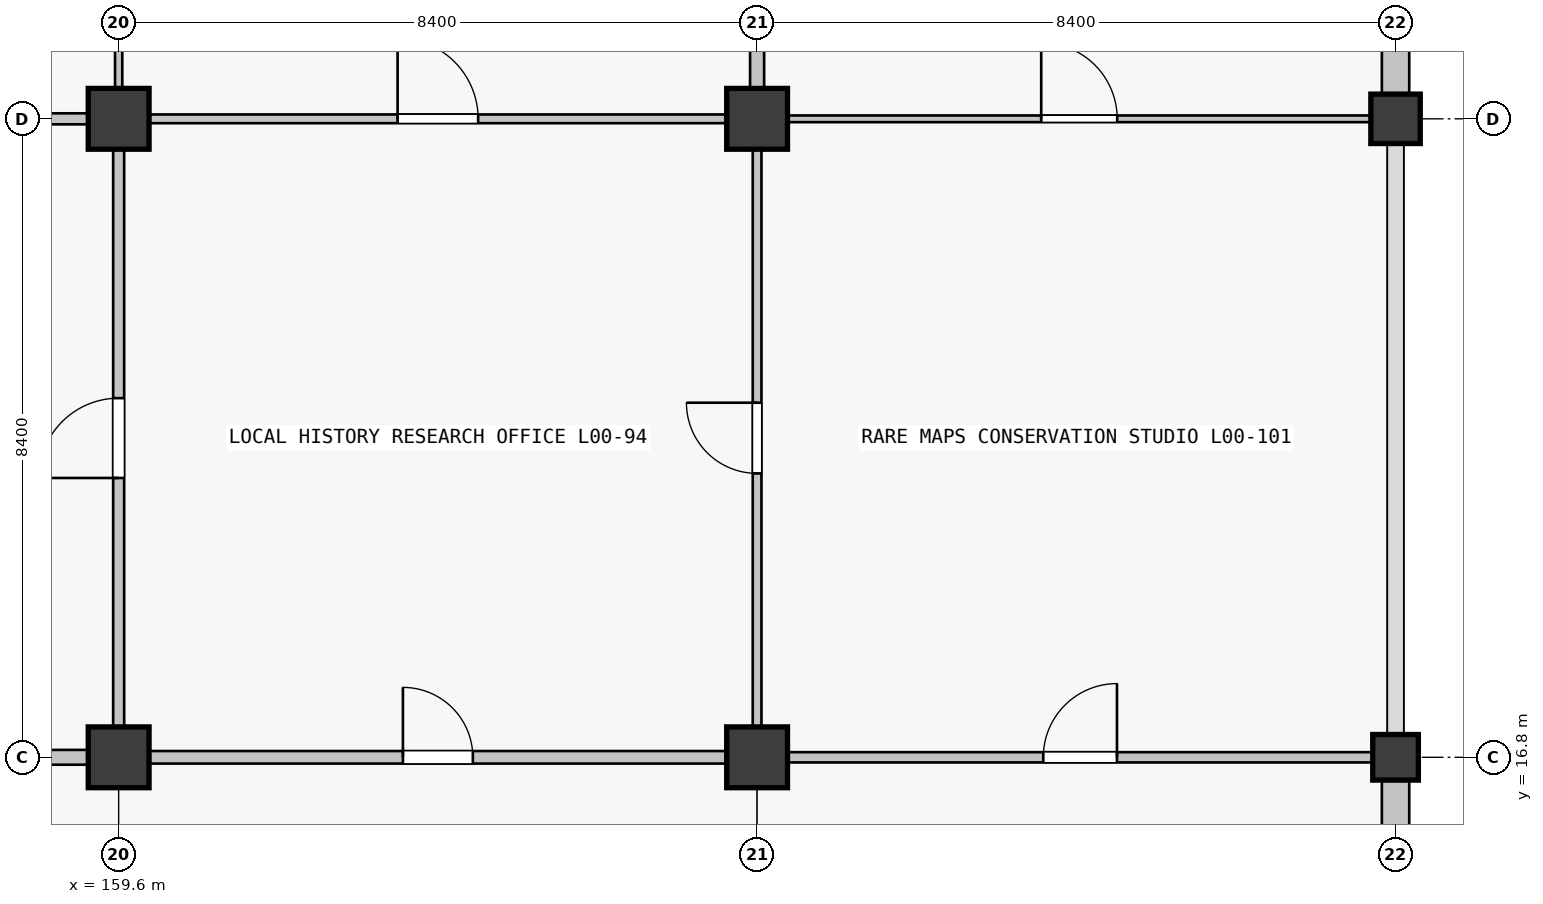
"""IFC4 building model, lengths in metres.
Left out: names, types, materials, properties, quantities, classifications, styles, units other than length and angle.
Written with IfcOpenShell. Run it as: python <this file> out.ifc"""

import sys

from ifc_helpers import new_model, si_unit, direction, frame, frame_2d, origin, origin_2d, place, context, subcontext, project, spatial, rectangle, extrude, element, fill, save


model = new_model("IFC4")
c1 = context("Model", 3, precision=1e-05, world=origin(), true_north=direction((0.0, 1.0)))
c2 = subcontext(c1, "Body", "Model", "MODEL_VIEW")
j1 = project(units=[si_unit("LENGTHUNIT", "METRE"), si_unit("PLANEANGLEUNIT", "RADIAN")], contexts=[c1])
p1 = place(None, origin())
s1 = spatial("IfcSite", under=j1, at=p1, CompositionType="ELEMENT")
p2 = place(p1, origin())
s2 = spatial("IfcBuilding", under=s1, at=p2, CompositionType="ELEMENT")
p3 = place(p2, origin())
s3 = spatial("IfcBuildingStorey", under=s2, at=p3, CompositionType="ELEMENT", Elevation=0.0)
for number, where, z_axis, x_axis in (
    (1, (159.6, 16.8, 0.0), (0.0, 0.0, 1.0), (1.0, 0.0, 0.0)),
    (2, (159.6, 25.2, 0.0), (0.0, 0.0, 1.0), (1.0, 0.0, 0.0)),
    (3, (168.0, 16.8, 0.0), (0.0, 0.0, 1.0), (1.0, 0.0, 0.0)),
    (4, (168.0, 25.2, 0.0), (0.0, 0.0, 1.0), (1.0, 0.0, 0.0)),
):
    element("IfcColumn", number, at=place(p3, frame(where, z_axis=z_axis, x_axis=x_axis)), inside=s3, PredefinedType="COLUMN", context=c2, shape_type="SweptSolid", body=[
        extrude(rectangle(XDim=0.8, YDim=0.8, at=origin_2d()), origin(), (0.0, 0.0, 1.0), 5.76),
    ])
p4 = place(p3, frame((176.4, 16.8, 0.0), z_axis=(0.0, 0.0, 1.0), x_axis=(1.0, 0.0, 0.0)))
e5 = element("IfcColumn", 5, at=p4, inside=s3, PredefinedType="COLUMN", context=c2, shape_type="SweptSolid", body=[
    extrude(rectangle(XDim=0.6, YDim=0.6, at=origin_2d()), origin(), (0.0, 0.0, 1.0), 5.76),
])
p5 = place(p3, frame((176.4, 25.2, 0.0), z_axis=(0.0, 0.0, 1.0), x_axis=(1.0, 0.0, 0.0)))
e6 = element("IfcColumn", 6, at=p5, inside=s3, PredefinedType="COLUMN", context=c2, shape_type="SweptSolid", body=[
    extrude(rectangle(XDim=0.65, YDim=0.65, at=origin_2d()), origin(), (0.0, 0.0, 1.0), 5.76),
])
p6 = place(p3, frame((176.4, 16.499, 0.0), z_axis=(0.0, 0.0, 1.0), x_axis=(0.0, -1.0, 0.0)))
e7 = element("IfcWall", 7, at=p6, inside=s3, PredefinedType="SOLIDWALL", context=c2, shape_type="SweptSolid", body=[
    extrude(rectangle(XDim=7.773, YDim=0.36, at=frame_2d((3.886, 0.0))), origin(), (0.0, 0.0, 1.0), 4.7),
])
p7 = place(p6, frame((2.886, 0.0, 0.9)))
e8 = element("IfcOpeningElement", 8, at=p7, cuts=e7, PredefinedType="OPENING", context=c2, shape_type="SweptSolid", body=[
    extrude(rectangle(XDim=2.0, YDim=2.1, at=frame_2d((1.0, 1.05))), frame((0.0, 0.18, 0.0), z_axis=(0.0, -1.0, 0.0), x_axis=(1.0, 0.0, 0.0)), (0.0, 0.0, 1.0), 0.36),
])
p8 = place(p3, frame((176.4, 33.299, 0.0), z_axis=(0.0, 0.0, 1.0), x_axis=(0.0, -1.0, 0.0)))
e9 = element("IfcWall", 9, at=p8, inside=s3, PredefinedType="SOLIDWALL", context=c2, shape_type="SweptSolid", body=[
    extrude(rectangle(XDim=7.773, YDim=0.36, at=frame_2d((3.887, 0.0))), origin(), (0.0, 0.0, 1.0), 4.7),
])
p9 = place(p8, frame((2.837, 0.0, 0.0)))
e10 = element("IfcOpeningElement", 10, at=p9, cuts=e9, PredefinedType="OPENING", context=c2, shape_type="SweptSolid", body=[
    extrude(rectangle(XDim=2.1, YDim=2.25, at=frame_2d((1.05, 1.125))), frame((0.0, 0.18, 0.0), z_axis=(0.0, -1.0, 0.0), x_axis=(1.0, 0.0, 0.0)), (0.0, 0.0, 1.0), 0.36),
])
p10 = place(p3, frame((151.602, 16.8, 0.0), z_axis=(0.0, 0.0, 1.0), x_axis=(1.0, 0.0, 0.0)))
e11 = element("IfcWall", 11, at=p10, inside=s3, PredefinedType="PARTITIONING", context=c2, shape_type="SweptSolid", body=[
    extrude(rectangle(XDim=7.596, YDim=0.195, at=frame_2d((3.798, 0.0))), origin(), (0.0, 0.0, 1.0), 3.66),
])
p11 = place(p10, frame((3.288, 0.0, 0.0)))
e12 = element("IfcOpeningElement", 12, at=p11, cuts=e11, PredefinedType="OPENING", context=c2, shape_type="SweptSolid", body=[
    extrude(rectangle(XDim=1.02, YDim=2.2, at=frame_2d((0.51, 1.1))), frame((0.0, 0.098, 0.0), z_axis=(0.0, -1.0, 0.0), x_axis=(1.0, 0.0, 0.0)), (0.0, 0.0, 1.0), 0.195),
])
p12 = place(p3, frame((151.602, 25.2, 0.0), z_axis=(0.0, 0.0, 1.0), x_axis=(1.0, 0.0, 0.0)))
e13 = element("IfcWall", 13, at=p12, inside=s3, PredefinedType="PARTITIONING", context=c2, shape_type="SweptSolid", body=[
    extrude(rectangle(XDim=7.596, YDim=0.145, at=frame_2d((3.798, 0.0))), origin(), (0.0, 0.0, 1.0), 3.66),
])
p13 = place(p12, frame((3.278, 0.0, 0.0)))
e14 = element("IfcOpeningElement", 14, at=p13, cuts=e13, PredefinedType="OPENING", context=c2, shape_type="SweptSolid", body=[
    extrude(rectangle(XDim=1.04, YDim=2.2, at=frame_2d((0.52, 1.1))), frame((0.0, 0.073, 0.0), z_axis=(0.0, -1.0, 0.0), x_axis=(1.0, 0.0, 0.0)), (0.0, 0.0, 1.0), 0.145),
])
p14 = place(p3, frame((160.002, 16.8, 0.0), z_axis=(0.0, 0.0, 1.0), x_axis=(1.0, 0.0, 0.0)))
e15 = element("IfcWall", 15, at=p14, inside=s3, PredefinedType="PARTITIONING", context=c2, shape_type="SweptSolid", body=[
    extrude(rectangle(XDim=7.596, YDim=0.165, at=frame_2d((3.798, 0.0))), origin(), (0.0, 0.0, 1.0), 3.66),
])
p15 = place(p14, frame((3.338, 0.0, 0.0)))
e16 = element("IfcOpeningElement", 16, at=p15, cuts=e15, PredefinedType="OPENING", context=c2, shape_type="SweptSolid", body=[
    extrude(rectangle(XDim=0.92, YDim=2.15, at=frame_2d((0.46, 1.075))), frame((0.0, 0.083, 0.0), z_axis=(0.0, -1.0, 0.0), x_axis=(1.0, 0.0, 0.0)), (0.0, 0.0, 1.0), 0.165),
])
p16 = place(p3, frame((160.002, 25.2, 0.0), z_axis=(0.0, 0.0, 1.0), x_axis=(1.0, 0.0, 0.0)))
e17 = element("IfcWall", 17, at=p16, inside=s3, PredefinedType="PARTITIONING", context=c2, shape_type="SweptSolid", body=[
    extrude(rectangle(XDim=7.596, YDim=0.115, at=frame_2d((3.798, 0.0))), origin(), (0.0, 0.0, 1.0), 3.66),
])
p17 = place(p16, frame((3.268, 0.0, 0.0)))
e18 = element("IfcOpeningElement", 18, at=p17, cuts=e17, PredefinedType="OPENING", context=c2, shape_type="SweptSolid", body=[
    extrude(rectangle(XDim=1.06, YDim=2.25, at=frame_2d((0.53, 1.125))), frame((0.0, 0.058, 0.0), z_axis=(0.0, -1.0, 0.0), x_axis=(1.0, 0.0, 0.0)), (0.0, 0.0, 1.0), 0.115),
])
p18 = place(p3, frame((168.402, 16.8, 0.0), z_axis=(0.0, 0.0, 1.0), x_axis=(1.0, 0.0, 0.0)))
e19 = element("IfcWall", 19, at=p18, inside=s3, PredefinedType="PARTITIONING", context=c2, shape_type="SweptSolid", body=[
    extrude(rectangle(XDim=7.696, YDim=0.135, at=frame_2d((3.848, 0.0))), origin(), (0.0, 0.0, 1.0), 3.66),
])
p19 = place(p18, frame((3.363, 0.0, 0.0)))
e20 = element("IfcOpeningElement", 20, at=p19, cuts=e19, PredefinedType="OPENING", context=c2, shape_type="SweptSolid", body=[
    extrude(rectangle(XDim=0.97, YDim=2.12, at=frame_2d((0.485, 1.06))), frame((0.0, 0.067, 0.0), z_axis=(0.0, -1.0, 0.0), x_axis=(1.0, 0.0, 0.0)), (0.0, 0.0, 1.0), 0.135),
])
p20 = place(p3, frame((168.402, 25.2, 0.0), z_axis=(0.0, 0.0, 1.0), x_axis=(1.0, 0.0, 0.0)))
e21 = element("IfcWall", 21, at=p20, inside=s3, PredefinedType="PARTITIONING", context=c2, shape_type="SweptSolid", body=[
    extrude(rectangle(XDim=7.671, YDim=0.088, at=frame_2d((3.835, 0.0))), origin(), (0.0, 0.0, 1.0), 3.66),
])
p21 = place(p20, frame((3.336, 0.0, 0.0)))
e22 = element("IfcOpeningElement", 22, at=p21, cuts=e21, PredefinedType="OPENING", context=c2, shape_type="SweptSolid", body=[
    extrude(rectangle(XDim=1.0, YDim=2.2, at=frame_2d((0.5, 1.1))), frame((0.0, 0.044, 0.0), z_axis=(0.0, -1.0, 0.0), x_axis=(1.0, 0.0, 0.0)), (0.0, 0.0, 1.0), 0.088),
])
p22 = place(p3, frame((159.6, 17.202, 0.0), z_axis=(0.0, 0.0, 1.0), x_axis=(0.0, 1.0, 0.0)))
e23 = element("IfcWall", 23, at=p22, inside=s3, PredefinedType="PARTITIONING", context=c2, shape_type="SweptSolid", body=[
    extrude(rectangle(XDim=7.596, YDim=0.145, at=frame_2d((3.798, 0.0))), origin(), (0.0, 0.0, 1.0), 3.66),
])
p23 = place(p22, frame((3.273, 0.0, 0.0)))
e24 = element("IfcOpeningElement", 24, at=p23, cuts=e23, PredefinedType="OPENING", context=c2, shape_type="SweptSolid", body=[
    extrude(rectangle(XDim=1.05, YDim=2.12, at=frame_2d((0.525, 1.06))), frame((0.0, 0.073, 0.0), z_axis=(0.0, -1.0, 0.0), x_axis=(1.0, 0.0, 0.0)), (0.0, 0.0, 1.0), 0.145),
])
p24 = place(p3, frame((159.6, 25.602, 0.0), z_axis=(0.0, 0.0, 1.0), x_axis=(0.0, 1.0, 0.0)))
e25 = element("IfcWall", 25, at=p24, inside=s3, PredefinedType="PARTITIONING", context=c2, shape_type="SweptSolid", body=[
    extrude(rectangle(XDim=7.596, YDim=0.095, at=frame_2d((3.798, 0.0))), origin(), (0.0, 0.0, 1.0), 3.66),
])
p25 = place(p24, frame((3.328, 0.0, 0.0)))
e26 = element("IfcOpeningElement", 26, at=p25, cuts=e25, PredefinedType="OPENING", context=c2, shape_type="SweptSolid", body=[
    extrude(rectangle(XDim=0.94, YDim=2.15, at=frame_2d((0.47, 1.075))), frame((0.0, 0.047, 0.0), z_axis=(0.0, -1.0, 0.0), x_axis=(1.0, 0.0, 0.0)), (0.0, 0.0, 1.0), 0.095),
])
p26 = place(p3, frame((168.0, 17.202, 0.0), z_axis=(0.0, 0.0, 1.0), x_axis=(0.0, 1.0, 0.0)))
e27 = element("IfcWall", 27, at=p26, inside=s3, PredefinedType="PARTITIONING", context=c2, shape_type="SweptSolid", body=[
    extrude(rectangle(XDim=7.596, YDim=0.115, at=frame_2d((3.798, 0.0))), origin(), (0.0, 0.0, 1.0), 3.66),
])
p27 = place(p26, frame((3.333, 0.0, 0.0)))
e28 = element("IfcOpeningElement", 28, at=p27, cuts=e27, PredefinedType="OPENING", context=c2, shape_type="SweptSolid", body=[
    extrude(rectangle(XDim=0.93, YDim=2.12, at=frame_2d((0.465, 1.06))), frame((0.0, 0.058, 0.0), z_axis=(0.0, -1.0, 0.0), x_axis=(1.0, 0.0, 0.0)), (0.0, 0.0, 1.0), 0.115),
])
p28 = place(p3, frame((168.0, 25.602, 0.0), z_axis=(0.0, 0.0, 1.0), x_axis=(0.0, 1.0, 0.0)))
e29 = element("IfcWall", 29, at=p28, inside=s3, PredefinedType="PARTITIONING", context=c2, shape_type="SweptSolid", body=[
    extrude(rectangle(XDim=7.596, YDim=0.185, at=frame_2d((3.798, 0.0))), origin(), (0.0, 0.0, 1.0), 3.66),
])
p29 = place(p28, frame((3.293, 0.0, 0.0)))
e30 = element("IfcOpeningElement", 30, at=p29, cuts=e29, PredefinedType="OPENING", context=c2, shape_type="SweptSolid", body=[
    extrude(rectangle(XDim=1.01, YDim=2.12, at=frame_2d((0.505, 1.06))), frame((0.0, 0.093, 0.0), z_axis=(0.0, -1.0, 0.0), x_axis=(1.0, 0.0, 0.0)), (0.0, 0.0, 1.0), 0.185),
])
p30 = place(p17, origin())
e31 = element("IfcDoor", 31, at=p30, inside=s3, OperationType="SINGLE_SWING_LEFT", PredefinedType="DOOR", context=c2, shape_type="SweptSolid", body=[
    extrude(rectangle(XDim=1.06, YDim=2.25, at=frame_2d((0.53, 1.125))), frame((0.0, 0.025, 0.0), z_axis=(0.0, -1.0, 0.0), x_axis=(1.0, 0.0, 0.0)), (0.0, 0.0, 1.0), 0.05),
])
fill(e18, e31)
p31 = place(p15, origin())
e32 = element("IfcDoor", 32, at=p31, inside=s3, OperationType="SINGLE_SWING_LEFT", PredefinedType="DOOR", context=c2, shape_type="SweptSolid", body=[
    extrude(rectangle(XDim=0.92, YDim=2.15, at=frame_2d((0.46, 1.075))), frame((0.0, 0.025, 0.0), z_axis=(0.0, -1.0, 0.0), x_axis=(1.0, 0.0, 0.0)), (0.0, 0.0, 1.0), 0.05),
])
fill(e16, e32)
p32 = place(p19, origin())
e33 = element("IfcDoor", 33, at=p32, inside=s3, OperationType="SINGLE_SWING_RIGHT", PredefinedType="DOOR", context=c2, shape_type="SweptSolid", body=[
    extrude(rectangle(XDim=0.97, YDim=2.12, at=frame_2d((0.485, 1.06))), frame((0.0, 0.025, 0.0), z_axis=(0.0, -1.0, 0.0), x_axis=(1.0, 0.0, 0.0)), (0.0, 0.0, 1.0), 0.05),
])
fill(e20, e33)
p33 = place(p21, origin())
e34 = element("IfcDoor", 34, at=p33, inside=s3, OperationType="SINGLE_SWING_LEFT", PredefinedType="DOOR", context=c2, shape_type="SweptSolid", body=[
    extrude(rectangle(XDim=1.0, YDim=2.2, at=frame_2d((0.5, 1.1))), frame((0.0, 0.025, 0.0), z_axis=(0.0, -1.0, 0.0), x_axis=(1.0, 0.0, 0.0)), (0.0, 0.0, 1.0), 0.05),
])
fill(e22, e34)
p34 = place(p23, origin())
e35 = element("IfcDoor", 35, at=p34, inside=s3, OperationType="SINGLE_SWING_LEFT", PredefinedType="DOOR", context=c2, shape_type="SweptSolid", body=[
    extrude(rectangle(XDim=1.05, YDim=2.12, at=frame_2d((0.525, 1.06))), frame((0.0, 0.025, 0.0), z_axis=(0.0, -1.0, 0.0), x_axis=(1.0, 0.0, 0.0)), (0.0, 0.0, 1.0), 0.05),
])
fill(e24, e35)
p35 = place(p27, origin())
e36 = element("IfcDoor", 36, at=p35, inside=s3, OperationType="SINGLE_SWING_RIGHT", PredefinedType="DOOR", context=c2, shape_type="SweptSolid", body=[
    extrude(rectangle(XDim=0.93, YDim=2.12, at=frame_2d((0.465, 1.06))), frame((0.0, 0.025, 0.0), z_axis=(0.0, -1.0, 0.0), x_axis=(1.0, 0.0, 0.0)), (0.0, 0.0, 1.0), 0.05),
])
fill(e28, e36)
save(model, sys.argv[1])
